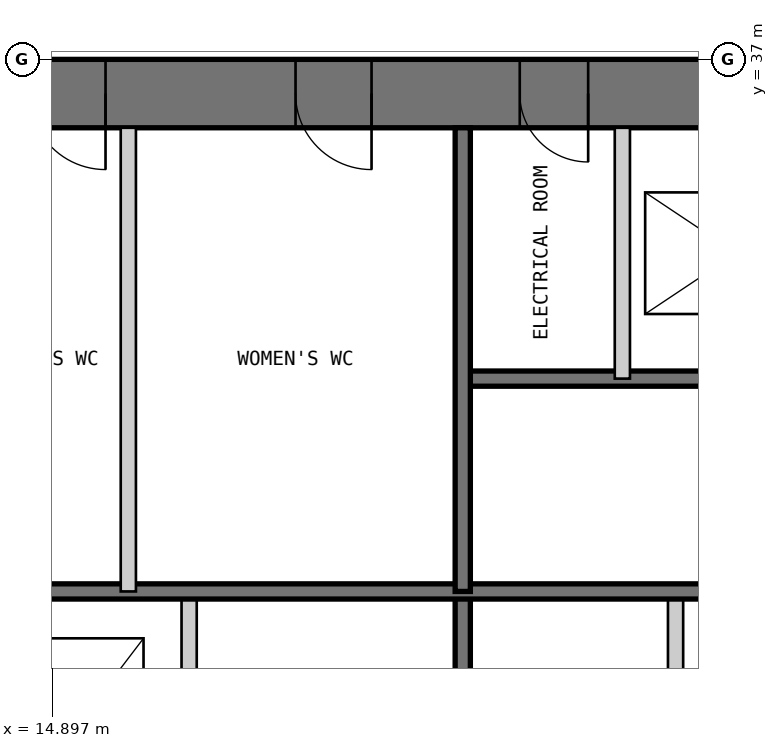
"""IFC4 building model, lengths in metres.
Left out: names, types, materials, properties, quantities, classifications, styles, units other than length and angle.
Written with IfcOpenShell. Run it as: python <this file> out.ifc"""

import sys

from ifc_helpers import new_model, si_unit, direction, frame, frame_2d, origin, place, context, subcontext, project, spatial, polyline, rectangle, outline, extrude, element, fill, save


model = new_model("IFC4")
c1 = context("Model", 3, precision=1e-05, world=origin(), true_north=direction((0.0, 1.0)))
c2 = subcontext(c1, "Body", "Model", "MODEL_VIEW")
j1 = project(units=[si_unit("LENGTHUNIT", "METRE"), si_unit("PLANEANGLEUNIT", "RADIAN")], contexts=[c1])
p1 = place(None, origin())
s1 = spatial("IfcSite", under=j1, at=p1, CompositionType="ELEMENT")
p2 = place(p1, origin())
s2 = spatial("IfcBuilding", under=s1, at=p2, CompositionType="ELEMENT")
p3 = place(p2, frame((0.0, 0.0, 67.0)))
s3 = spatial("IfcBuildingStorey", under=s2, at=p3, CompositionType="ELEMENT", Elevation=67.0)
p4 = place(p3, frame((37.0, 36.55, 0.0), z_axis=(0.0, 0.0, 1.0), x_axis=(-1.0, 0.0, 0.0)))
e1 = element("IfcWall", 1, at=p4, inside=s3, PredefinedType="SHEAR", context=c2, shape_type="SweptSolid", body=[
    extrude(outline(polyline([(0.0, -0.45), (24.0, -0.45), (23.1, 0.45), (0.9, 0.45), (0.0, -0.45)])), origin(), (0.0, 0.0, 1.0), 4.0),
])
p5 = place(p4, frame((4.9, 0.0, 0.0)))
e2 = element("IfcOpeningElement", 2, at=p5, cuts=e1, PredefinedType="OPENING", context=c2, shape_type="SweptSolid", body=[
    extrude(rectangle(XDim=1.0, YDim=2.2, at=frame_2d((0.5, 1.1))), frame((0.0, 0.46, 0.0), z_axis=(0.0, -1.0, 0.0), x_axis=(1.0, 0.0, 0.0)), (0.0, 0.0, 1.0), 0.92),
])
p6 = place(p4, frame((8.9, 0.0, 0.0)))
e3 = element("IfcOpeningElement", 3, at=p6, cuts=e1, PredefinedType="OPENING", context=c2, shape_type="SweptSolid", body=[
    extrude(rectangle(XDim=1.1, YDim=2.2, at=frame_2d((0.55, 1.1))), frame((0.0, 0.46, 0.0), z_axis=(0.0, -1.0, 0.0), x_axis=(1.0, 0.0, 0.0)), (0.0, 0.0, 1.0), 0.92),
])
p7 = place(p4, frame((15.05, 0.0, 0.0)))
e4 = element("IfcOpeningElement", 4, at=p7, cuts=e1, PredefinedType="OPENING", context=c2, shape_type="SweptSolid", body=[
    extrude(rectangle(XDim=0.9, YDim=2.2, at=frame_2d((0.45, 1.1))), frame((0.0, 0.46, 0.0), z_axis=(0.0, -1.0, 0.0), x_axis=(1.0, 0.0, 0.0)), (0.0, 0.0, 1.0), 0.92),
])
p8 = place(p4, frame((17.9, 0.0, 0.0)))
e5 = element("IfcOpeningElement", 5, at=p8, cuts=e1, PredefinedType="OPENING", context=c2, shape_type="SweptSolid", body=[
    extrude(rectangle(XDim=1.0, YDim=2.2, at=frame_2d((0.5, 1.1))), frame((0.0, 0.46, 0.0), z_axis=(0.0, -1.0, 0.0), x_axis=(1.0, 0.0, 0.0)), (0.0, 0.0, 1.0), 0.92),
])
p9 = place(p4, frame((21.4, 0.0, 0.0)))
e6 = element("IfcOpeningElement", 6, at=p9, cuts=e1, PredefinedType="OPENING", context=c2, shape_type="SweptSolid", body=[
    extrude(rectangle(XDim=1.0, YDim=2.2, at=frame_2d((0.5, 1.1))), frame((0.0, 0.46, 0.0), z_axis=(0.0, -1.0, 0.0), x_axis=(1.0, 0.0, 0.0)), (0.0, 0.0, 1.0), 0.92),
])
p10 = place(p3, frame((16.7, 13.9, 0.0), z_axis=(0.0, 0.0, 1.0), x_axis=(0.0, 1.0, 0.0)))
e7 = element("IfcWall", 7, at=p10, inside=s3, PredefinedType="PARTITIONING", context=c2, shape_type="SweptSolid", body=[
    extrude(rectangle(XDim=16.1, YDim=0.2, at=frame_2d((8.05, 0.0))), origin(), (0.0, 0.0, 1.0), 3.8),
])
p11 = place(p10, frame((3.8, 0.0, 0.0)))
e8 = element("IfcOpeningElement", 8, at=p11, cuts=e7, PredefinedType="OPENING", context=c2, shape_type="SweptSolid", body=[
    extrude(rectangle(XDim=0.9, YDim=2.2, at=frame_2d((0.45, 1.1))), frame((0.0, 0.11, 0.0), z_axis=(0.0, -1.0, 0.0), x_axis=(1.0, 0.0, 0.0)), (0.0, 0.0, 1.0), 0.22),
])
p12 = place(p10, frame((7.217, 0.0, 0.0)))
e9 = element("IfcOpeningElement", 9, at=p12, cuts=e7, PredefinedType="OPENING", context=c2, shape_type="SweptSolid", body=[
    extrude(rectangle(XDim=1.1, YDim=2.2, at=frame_2d((0.55, 1.1))), frame((0.0, 0.11, 0.0), z_axis=(0.0, -1.0, 0.0), x_axis=(1.0, 0.0, 0.0)), (0.0, 0.0, 1.0), 0.22),
])
p13 = place(p10, frame((10.55, 0.0, 0.0)))
e10 = element("IfcOpeningElement", 10, at=p13, cuts=e7, PredefinedType="OPENING", context=c2, shape_type="SweptSolid", body=[
    extrude(rectangle(XDim=1.1, YDim=2.2, at=frame_2d((0.55, 1.1))), frame((0.0, 0.11, 0.0), z_axis=(0.0, -1.0, 0.0), x_axis=(1.0, 0.0, 0.0)), (0.0, 0.0, 1.0), 0.22),
])
p14 = place(p10, frame((13.883, 0.0, 0.0)))
e11 = element("IfcOpeningElement", 11, at=p14, cuts=e7, PredefinedType="OPENING", context=c2, shape_type="SweptSolid", body=[
    extrude(rectangle(XDim=1.1, YDim=2.2, at=frame_2d((0.55, 1.1))), frame((0.0, 0.11, 0.0), z_axis=(0.0, -1.0, 0.0), x_axis=(1.0, 0.0, 0.0)), (0.0, 0.0, 1.0), 0.22),
])
p15 = place(p3, frame((20.3, 13.9, 0.0), z_axis=(0.0, 0.0, 1.0), x_axis=(0.0, 1.0, 0.0)))
e12 = element("IfcWall", 12, at=p15, inside=s3, PredefinedType="SOLIDWALL", context=c2, shape_type="SweptSolid", body=[
    extrude(rectangle(XDim=16.1, YDim=0.2, at=frame_2d((8.05, 0.0))), origin(), (0.0, 0.0, 1.0), 3.8),
])
p16 = place(p3, frame((23.1, 20.0, 0.0), z_axis=(0.0, 0.0, 1.0), x_axis=(0.0, 1.0, 0.0)))
e13 = element("IfcWall", 13, at=p16, inside=s3, PredefinedType="PARTITIONING", context=c2, shape_type="SweptSolid", body=[
    extrude(rectangle(XDim=10.0, YDim=0.2, at=frame_2d((5.0, 0.0))), origin(), (0.0, 0.0, 1.0), 3.8),
])
p17 = place(p3, frame((29.7, 32.8, 0.0), z_axis=(0.0, 0.0, 1.0), x_axis=(-1.0, 0.0, 0.0)))
e14 = element("IfcWall", 14, at=p17, inside=s3, PredefinedType="SOLIDWALL", context=c2, shape_type="SweptSolid", body=[
    extrude(rectangle(XDim=9.4, YDim=0.2, at=frame_2d((4.7, 0.0))), origin(), (0.0, 0.0, 1.0), 3.8),
])
p18 = place(p17, frame((0.25, 0.0, 0.0)))
e15 = element("IfcOpeningElement", 15, at=p18, cuts=e14, PredefinedType="OPENING", context=c2, shape_type="SweptSolid", body=[
    extrude(rectangle(XDim=1.0, YDim=2.2, at=frame_2d((0.5, 1.1))), frame((0.0, 0.11, 0.0), z_axis=(0.0, -1.0, 0.0), x_axis=(1.0, 0.0, 0.0)), (0.0, 0.0, 1.0), 0.22),
])
p19 = place(p3, frame((29.7, 30.0, 0.0), z_axis=(0.0, 0.0, 1.0), x_axis=(-1.0, 0.0, 0.0)))
e16 = element("IfcWall", 16, at=p19, inside=s3, PredefinedType="SOLIDWALL", context=c2, shape_type="SweptSolid", body=[
    extrude(rectangle(XDim=15.8, YDim=0.2, at=frame_2d((7.9, 0.0))), origin(), (0.0, 0.0, 1.0), 3.8),
])
p20 = place(p3, frame((22.4, 36.1, 0.0), z_axis=(0.0, 0.0, 1.0), x_axis=(0.0, -1.0, 0.0)))
e17 = element("IfcWall", 17, at=p20, inside=s3, PredefinedType="PARTITIONING", context=c2, shape_type="SweptSolid", body=[
    extrude(rectangle(XDim=3.3, YDim=0.2, at=frame_2d((1.65, 0.0))), origin(), (0.0, 0.0, 1.0), 3.8),
])
p21 = place(p3, frame((20.3, 36.1, 0.0), z_axis=(0.0, 0.0, 1.0), x_axis=(0.0, -1.0, 0.0)))
e18 = element("IfcWall", 18, at=p21, inside=s3, PredefinedType="SOLIDWALL", context=c2, shape_type="SweptSolid", body=[
    extrude(rectangle(XDim=6.1, YDim=0.2, at=frame_2d((3.05, 0.0))), origin(), (0.0, 0.0, 1.0), 3.8),
])
p22 = place(p3, frame((15.9, 36.1, 0.0), z_axis=(0.0, 0.0, 1.0), x_axis=(0.0, -1.0, 0.0)))
e19 = element("IfcWall", 19, at=p22, inside=s3, PredefinedType="PARTITIONING", context=c2, shape_type="SweptSolid", body=[
    extrude(rectangle(XDim=6.1, YDim=0.2, at=frame_2d((3.05, 0.0))), origin(), (0.0, 0.0, 1.0), 3.8),
])
p23 = place(p7, origin())
e20 = element("IfcDoor", 20, at=p23, inside=s3, OperationType="SINGLE_SWING_LEFT", PredefinedType="DOOR", context=c2, shape_type="SweptSolid", body=[
    extrude(rectangle(XDim=0.9, YDim=2.2, at=frame_2d((0.45, 1.1))), frame((0.0, 0.025, 0.0), z_axis=(0.0, -1.0, 0.0), x_axis=(1.0, 0.0, 0.0)), (0.0, 0.0, 1.0), 0.05),
    extrude(outline(polyline([(0.0, 0.0), (0.04, 0.0), (0.04, 2.16), (0.86, 2.16), (0.86, 0.0), (0.9, 0.0), (0.9, 2.2), (0.0, 2.2), (0.0, 0.0)])), frame((0.0, 0.3, 0.0), z_axis=(0.0, -1.0, 0.0), x_axis=(1.0, 0.0, 0.0)), (0.0, 0.0, 1.0), 0.6),
])
fill(e4, e20)
p24 = place(p8, origin())
e21 = element("IfcDoor", 21, at=p24, inside=s3, OperationType="SINGLE_SWING_LEFT", PredefinedType="DOOR", context=c2, shape_type="SweptSolid", body=[
    extrude(rectangle(XDim=1.0, YDim=2.2, at=frame_2d((0.5, 1.1))), frame((0.0, 0.025, 0.0), z_axis=(0.0, -1.0, 0.0), x_axis=(1.0, 0.0, 0.0)), (0.0, 0.0, 1.0), 0.05),
    extrude(outline(polyline([(0.0, 0.0), (0.04, 0.0), (0.04, 2.16), (0.96, 2.16), (0.96, 0.0), (1.0, 0.0), (1.0, 2.2), (0.0, 2.2), (0.0, 0.0)])), frame((0.0, 0.3, 0.0), z_axis=(0.0, -1.0, 0.0), x_axis=(1.0, 0.0, 0.0)), (0.0, 0.0, 1.0), 0.6),
])
fill(e5, e21)
p25 = place(p9, origin())
e22 = element("IfcDoor", 22, at=p25, inside=s3, OperationType="SINGLE_SWING_LEFT", PredefinedType="DOOR", context=c2, shape_type="SweptSolid", body=[
    extrude(rectangle(XDim=1.0, YDim=2.2, at=frame_2d((0.5, 1.1))), frame((0.0, 0.025, 0.0), z_axis=(0.0, -1.0, 0.0), x_axis=(1.0, 0.0, 0.0)), (0.0, 0.0, 1.0), 0.05),
    extrude(outline(polyline([(0.0, 0.0), (0.04, 0.0), (0.04, 2.16), (0.96, 2.16), (0.96, 0.0), (1.0, 0.0), (1.0, 2.2), (0.0, 2.2), (0.0, 0.0)])), frame((0.0, 0.3, 0.0), z_axis=(0.0, -1.0, 0.0), x_axis=(1.0, 0.0, 0.0)), (0.0, 0.0, 1.0), 0.6),
])
fill(e6, e22)
save(model, sys.argv[1])
